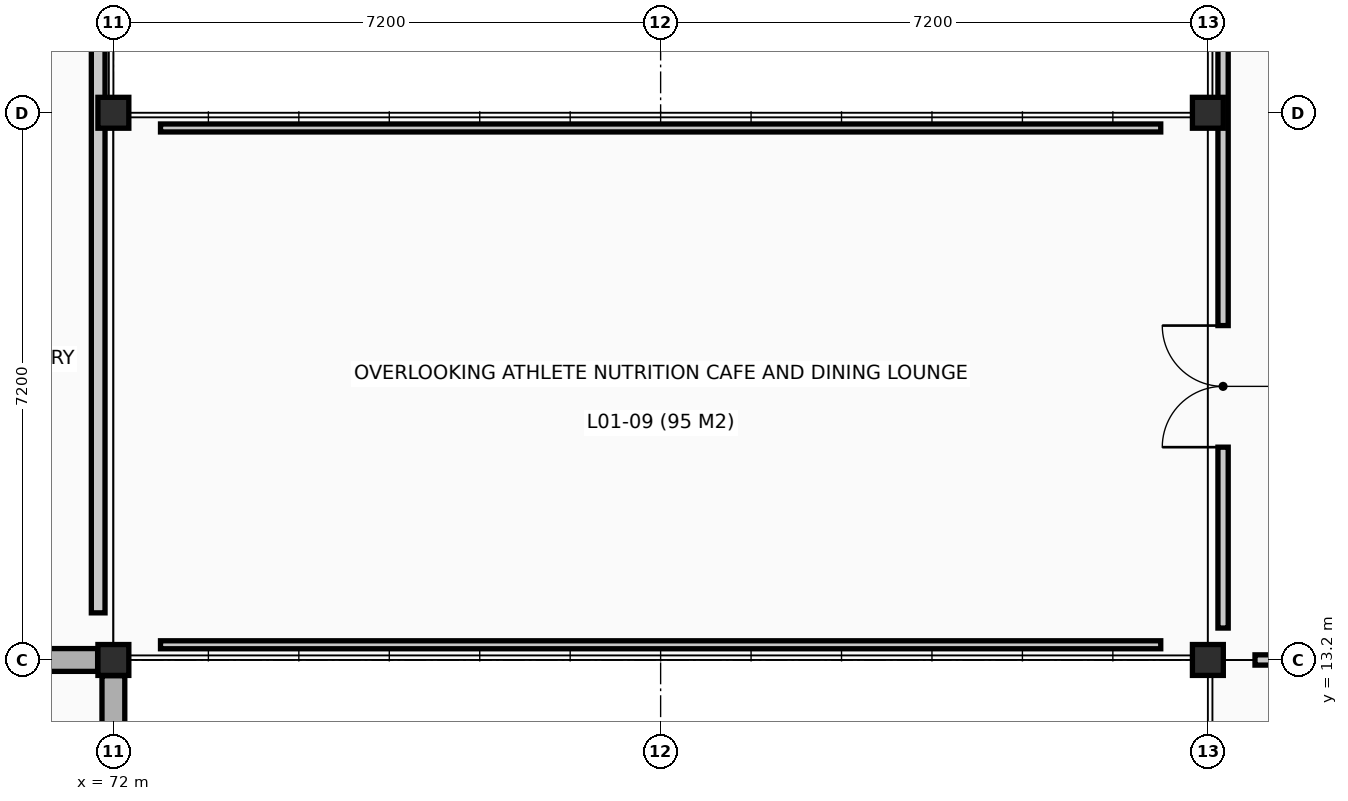
"""IFC4 building model, lengths in metres.
Left out: names, types, materials, properties, quantities, classifications, styles, units other than length and angle.
Written with IfcOpenShell. Run it as: python <this file> out.ifc"""

import sys

from ifc_helpers import new_model, si_unit, direction, frame, frame_2d, origin, origin_2d, place, context, subcontext, project, spatial, rectangle, hollow_circle, extrude, element, fill, save


model = new_model("IFC4")
c1 = context("Model", 3, precision=1e-05, world=origin(), true_north=direction((0.0, 1.0)))
c2 = subcontext(c1, "Body", "Model", "MODEL_VIEW")
j1 = project(units=[si_unit("LENGTHUNIT", "METRE"), si_unit("PLANEANGLEUNIT", "RADIAN")], contexts=[c1])
p1 = place(None, origin())
s1 = spatial("IfcSite", under=j1, at=p1, CompositionType="ELEMENT")
p2 = place(p1, origin())
s2 = spatial("IfcBuilding", under=s1, at=p2, CompositionType="ELEMENT")
p3 = place(p2, frame((0.0, 0.0, 4.8)))
s3 = spatial("IfcBuildingStorey", under=s2, at=p3, CompositionType="ELEMENT", Elevation=4.8)
for number, where, z_axis, x_axis in (
    (1, (72.0, 13.2, 0.0), (0.0, 0.0, 1.0), (1.0, 0.0, 0.0)),
    (2, (72.0, 20.4, 0.0), (0.0, 0.0, 1.0), (1.0, 0.0, 0.0)),
    (3, (86.4, 13.2, 0.0), (0.0, 0.0, 1.0), (1.0, 0.0, 0.0)),
    (4, (86.4, 20.4, 0.0), (0.0, 0.0, 1.0), (1.0, 0.0, 0.0)),
):
    element("IfcColumn", number, at=place(p3, frame(where, z_axis=z_axis, x_axis=x_axis)), inside=s3, PredefinedType="COLUMN", context=c2, shape_type="SweptSolid", body=[
        extrude(hollow_circle(Radius=0.203, WallThickness=0.016, at=origin_2d()), origin(), (0.0, 0.0, 1.0), 4.8),
    ])
p4 = place(p3, frame((72.0, 0.207, 0.0), z_axis=(0.0, 0.0, 1.0), x_axis=(0.0, 1.0, 0.0)))
e5 = element("IfcWall", 5, at=p4, inside=s3, PredefinedType="SOLIDWALL", context=c2, shape_type="SweptSolid", body=[
    extrude(rectangle(XDim=12.786, YDim=0.3, at=frame_2d((6.393, 0.0))), origin(), (0.0, 0.0, 1.0), 4.095),
])
p5 = place(p3, frame((64.954, 13.2, 0.0), z_axis=(0.0, 0.0, 1.0), x_axis=(1.0, 0.0, 0.0)))
e6 = element("IfcWall", 6, at=p5, inside=s3, PredefinedType="SOLIDWALL", context=c2, shape_type="SweptSolid", body=[
    extrude(rectangle(XDim=6.839, YDim=0.3, at=frame_2d((3.419, 0.0))), origin(), (0.0, 0.0, 1.0), 3.995),
])
p6 = place(p5, frame((2.546, 0.0, 0.0)))
e7 = element("IfcOpeningElement", 7, at=p6, cuts=e6, PredefinedType="OPENING", context=c2, shape_type="SweptSolid", body=[
    extrude(rectangle(XDim=1.8, YDim=2.4, at=frame_2d((0.9, 1.2))), frame((0.0, 0.16, 0.0), z_axis=(0.0, -1.0, 0.0), x_axis=(1.0, 0.0, 0.0)), (0.0, 0.0, 1.0), 0.32),
])
p7 = place(p3, frame((71.8, 13.82, 0.0), z_axis=(0.0, 0.0, 1.0), x_axis=(0.0, 1.0, 0.0)))
e8 = element("IfcWall", 8, at=p7, inside=s3, PredefinedType="PARTITIONING", context=c2, shape_type="SweptSolid", body=[
    extrude(rectangle(XDim=19.76, YDim=0.18, at=frame_2d((9.88, 0.0))), origin(), (0.0, 0.0, 1.0), 3.99),
])
p8 = place(p3, frame((87.02, 13.2, 0.0), z_axis=(0.0, 0.0, 1.0), x_axis=(1.0, 0.0, 0.0)))
e9 = element("IfcWall", 9, at=p8, inside=s3, PredefinedType="PARTITIONING", context=c2, shape_type="SweptSolid", body=[
    extrude(rectangle(XDim=6.16, YDim=0.135, at=frame_2d((3.08, 0.0))), origin(), (0.0, 0.0, 1.0), 4.545),
])
p9 = place(p8, frame((2.58, 0.0, 0.0)))
e10 = element("IfcOpeningElement", 10, at=p9, cuts=e9, PredefinedType="OPENING", context=c2, shape_type="SweptSolid", body=[
    extrude(rectangle(XDim=1.0, YDim=2.1, at=frame_2d((0.5, 1.05))), frame((0.0, 0.077, 0.0), z_axis=(0.0, -1.0, 0.0), x_axis=(1.0, 0.0, 0.0)), (0.0, 0.0, 1.0), 0.155),
])
p10 = place(p3, frame((86.6, 13.62, 0.0), z_axis=(0.0, 0.0, 1.0), x_axis=(0.0, 1.0, 0.0)))
e11 = element("IfcWall", 11, at=p10, inside=s3, PredefinedType="PARTITIONING", context=c2, shape_type="SweptSolid", body=[
    extrude(rectangle(XDim=20.76, YDim=0.135, at=frame_2d((10.38, 0.0))), origin(), (0.0, 0.0, 1.0), 3.99),
])
p11 = place(p10, frame((2.38, 0.0, 0.0)))
e12 = element("IfcOpeningElement", 12, at=p11, cuts=e11, PredefinedType="OPENING", context=c2, shape_type="SweptSolid", body=[
    extrude(rectangle(XDim=1.6, YDim=2.2, at=frame_2d((0.8, 1.1))), frame((0.0, 0.077, 0.0), z_axis=(0.0, -1.0, 0.0), x_axis=(1.0, 0.0, 0.0)), (0.0, 0.0, 1.0), 0.155),
])
p12 = place(p3, frame((72.62, 13.4, 0.0), z_axis=(0.0, 0.0, 1.0), x_axis=(1.0, 0.0, 0.0)))
e13 = element("IfcWall", 13, at=p12, inside=s3, PredefinedType="PARTITIONING", context=c2, shape_type="SweptSolid", body=[
    extrude(rectangle(XDim=13.16, YDim=0.105, at=frame_2d((6.58, 0.0))), origin(), (0.0, 0.0, 1.0), 3.84),
])
p13 = place(p3, frame((72.62, 20.2, 0.0), z_axis=(0.0, 0.0, 1.0), x_axis=(1.0, 0.0, 0.0)))
e14 = element("IfcWall", 14, at=p13, inside=s3, PredefinedType="PARTITIONING", context=c2, shape_type="SweptSolid", body=[
    extrude(rectangle(XDim=13.16, YDim=0.105, at=frame_2d((6.58, 0.0))), origin(), (0.0, 0.0, 1.0), 4.545),
])
p14 = place(p11, origin())
e15 = element("IfcDoor", 15, at=p14, inside=s3, OperationType="DOUBLE_DOOR_SINGLE_SWING", PredefinedType="DOOR", context=c2, shape_type="SweptSolid", body=[
    extrude(rectangle(XDim=1.6, YDim=2.2, at=frame_2d((0.8, 1.1))), frame((0.0, 0.025, 0.0), z_axis=(0.0, -1.0, 0.0), x_axis=(1.0, 0.0, 0.0)), (0.0, 0.0, 1.0), 0.05),
])
fill(e12, e15)
save(model, sys.argv[1])
